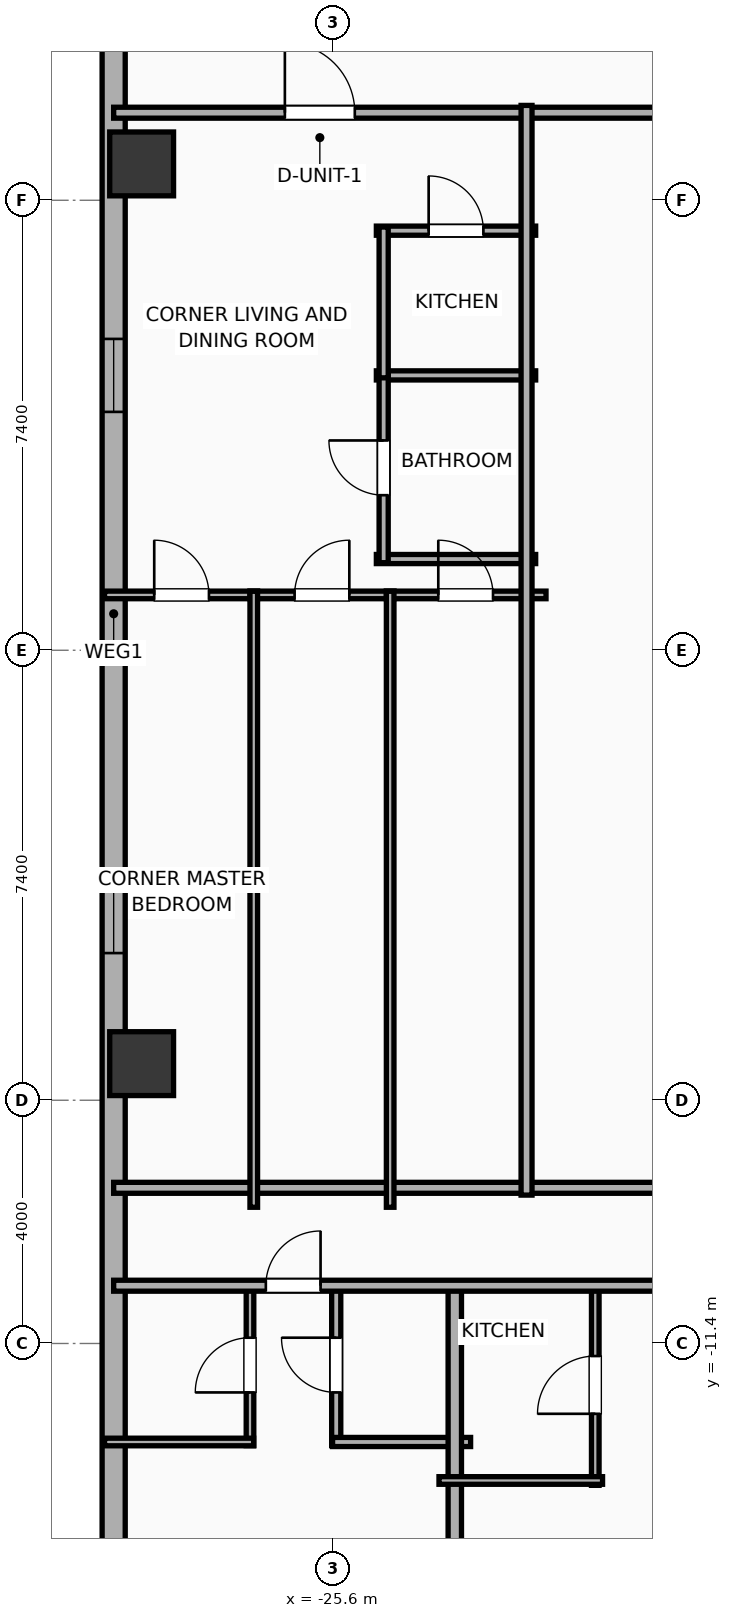
"""IFC4 building model, lengths in metres.
Left out: names, types, materials, properties, quantities, classifications, styles, units other than length and angle.
Written with IfcOpenShell. Run it as: python <this file> out.ifc"""

import sys

from ifc_helpers import new_model, si_unit, direction, frame, frame_2d, origin, origin_2d, place, context, subcontext, project, spatial, rectangle, hollow_rectangle, extrude, element, fill, save


model = new_model("IFC4")
c1 = context("Model", 3, precision=1e-05, world=origin(), true_north=direction((0.0, 1.0)))
c2 = subcontext(c1, "Body", "Model", "MODEL_VIEW")
j1 = project(units=[si_unit("LENGTHUNIT", "METRE"), si_unit("PLANEANGLEUNIT", "RADIAN")], contexts=[c1])
p1 = place(None, origin())
s1 = spatial("IfcSite", under=j1, at=p1, CompositionType="ELEMENT")
p2 = place(p1, origin())
s2 = spatial("IfcBuilding", under=s1, at=p2, CompositionType="ELEMENT")
p3 = place(p2, frame((0.0, 0.0, 93.6)))
s3 = spatial("IfcBuildingStorey", under=s2, at=p3, CompositionType="ELEMENT", Elevation=93.6)
for number, where, z_axis, x_axis in (
    (1, (-28.75, 7.998, 0.0), (0.0, 0.0, 1.0), (1.0, 0.0, 0.0)),
    (2, (-28.75, -6.798, 0.0), (0.0, 0.0, 1.0), (1.0, 0.0, 0.0)),
):
    element("IfcColumn", number, at=place(p3, frame(where, z_axis=z_axis, x_axis=x_axis)), inside=s3, PredefinedType="COLUMN", context=c2, shape_type="SweptSolid", body=[
        extrude(hollow_rectangle(XDim=1.05, YDim=1.05, WallThickness=0.036, at=origin_2d()), origin(), (0.0, 0.0, 1.0), 3.9),
    ])
p4 = place(p3, frame((-29.21, -16.581, 0.0), z_axis=(0.0, 0.0, 1.0), x_axis=(0.0, 1.0, 0.0)))
e3 = element("IfcWall", 3, at=p4, inside=s3, PredefinedType="ELEMENTEDWALL", context=c2, shape_type="SweptSolid", body=[
    extrude(rectangle(XDim=34.363, YDim=0.38, at=frame_2d((17.181, 0.0))), origin(), (0.0, 0.0, 1.0), 3.65),
])
p5 = place(p4, frame((30.932, 0.0, 0.75)))
e4 = element("IfcOpeningElement", 4, at=p5, cuts=e3, PredefinedType="OPENING", context=c2, shape_type="SweptSolid", body=[
    extrude(rectangle(XDim=1.2, YDim=2.05, at=frame_2d((0.6, 1.025))), frame((0.0, 0.2, 0.0), z_axis=(0.0, -1.0, 0.0), x_axis=(1.0, 0.0, 0.0)), (0.0, 0.0, 1.0), 0.4),
])
p6 = place(p4, frame((20.501, 0.0, 0.75)))
e5 = element("IfcOpeningElement", 5, at=p6, cuts=e3, PredefinedType="OPENING", context=c2, shape_type="SweptSolid", body=[
    extrude(rectangle(XDim=1.2, YDim=2.05, at=frame_2d((0.6, 1.025))), frame((0.0, 0.2, 0.0), z_axis=(0.0, -1.0, 0.0), x_axis=(1.0, 0.0, 0.0)), (0.0, 0.0, 1.0), 0.4),
])
p7 = place(p4, frame((11.601, 0.0, 0.75)))
e6 = element("IfcOpeningElement", 6, at=p7, cuts=e3, PredefinedType="OPENING", context=c2, shape_type="SweptSolid", body=[
    extrude(rectangle(XDim=1.2, YDim=2.05, at=frame_2d((0.6, 1.025))), frame((0.0, 0.2, 0.0), z_axis=(0.0, -1.0, 0.0), x_axis=(1.0, 0.0, 0.0)), (0.0, 0.0, 1.0), 0.4),
])
p8 = place(p3, frame((-29.21, 8.84, 0.0), z_axis=(0.0, 0.0, 1.0), x_axis=(1.0, 0.0, 0.0)))
e7 = element("IfcWall", 7, at=p8, inside=s3, PredefinedType="PARTITIONING", context=c2, shape_type="SweptSolid", body=[
    extrude(rectangle(XDim=19.33, YDim=0.18, at=frame_2d((9.665, 0.0))), origin(), (0.0, 0.0, 1.0), 3.65),
])
p9 = place(p8, frame((2.815, 0.0, 0.0)))
e8 = element("IfcOpeningElement", 8, at=p9, cuts=e7, PredefinedType="OPENING", context=c2, shape_type="SweptSolid", body=[
    extrude(rectangle(XDim=1.15, YDim=2.05, at=frame_2d((0.575, 1.025))), frame((0.0, 0.1, 0.0), z_axis=(0.0, -1.0, 0.0), x_axis=(1.0, 0.0, 0.0)), (0.0, 0.0, 1.0), 0.2),
])
p10 = place(p3, frame((-29.21, -8.84, 0.0), z_axis=(0.0, 0.0, 1.0), x_axis=(1.0, 0.0, 0.0)))
e9 = element("IfcWall", 9, at=p10, inside=s3, PredefinedType="PARTITIONING", context=c2, shape_type="SweptSolid", body=[
    extrude(rectangle(XDim=19.33, YDim=0.18, at=frame_2d((9.665, 0.0))), origin(), (0.0, 0.0, 1.0), 3.65),
])
p11 = place(p3, frame((-26.968, -13.08, 0.0), z_axis=(0.0, 0.0, 1.0), x_axis=(0.0, 1.0, 0.0)))
e10 = element("IfcWall", 10, at=p11, inside=s3, PredefinedType="PARTITIONING", context=c2, shape_type="SweptSolid", body=[
    extrude(rectangle(XDim=2.65, YDim=0.125, at=frame_2d((1.325, 0.0))), origin(), (0.0, 0.0, 1.0), 3.65),
])
p12 = place(p11, frame((0.875, 0.0, 0.0)))
e11 = element("IfcOpeningElement", 11, at=p12, cuts=e10, PredefinedType="OPENING", context=c2, shape_type="SweptSolid", body=[
    extrude(rectangle(XDim=0.9, YDim=2.05, at=frame_2d((0.45, 1.025))), frame((0.0, 0.073, 0.0), z_axis=(0.0, -1.0, 0.0), x_axis=(1.0, 0.0, 0.0)), (0.0, 0.0, 1.0), 0.145),
])
p13 = place(p3, frame((-25.55, -13.08, 0.0), z_axis=(0.0, 0.0, 1.0), x_axis=(0.0, 1.0, 0.0)))
e12 = element("IfcWall", 12, at=p13, inside=s3, PredefinedType="PLUMBINGWALL", context=c2, shape_type="SweptSolid", body=[
    extrude(rectangle(XDim=2.65, YDim=0.15, at=frame_2d((1.325, 0.0))), origin(), (0.0, 0.0, 1.0), 3.65),
])
p14 = place(p13, frame((0.875, 0.0, 0.0)))
e13 = element("IfcOpeningElement", 13, at=p14, cuts=e12, PredefinedType="OPENING", context=c2, shape_type="SweptSolid", body=[
    extrude(rectangle(XDim=0.9, YDim=2.05, at=frame_2d((0.45, 1.025))), frame((0.0, 0.085, 0.0), z_axis=(0.0, -1.0, 0.0), x_axis=(1.0, 0.0, 0.0)), (0.0, 0.0, 1.0), 0.17),
])
p15 = place(p3, frame((-29.36, -13.02, 0.0), z_axis=(0.0, 0.0, 1.0), x_axis=(1.0, 0.0, 0.0)))
e14 = element("IfcWall", 14, at=p15, inside=s3, PredefinedType="PARTITIONING", context=c2, shape_type="SweptSolid", body=[
    extrude(rectangle(XDim=2.452, YDim=0.125, at=frame_2d((1.226, 0.0))), origin(), (0.0, 0.0, 1.0), 3.65),
])
p16 = place(p3, frame((-25.61, -13.02, 0.0), z_axis=(0.0, 0.0, 1.0), x_axis=(1.0, 0.0, 0.0)))
e15 = element("IfcWall", 15, at=p16, inside=s3, PredefinedType="PLUMBINGWALL", context=c2, shape_type="SweptSolid", body=[
    extrude(rectangle(XDim=2.27, YDim=0.15, at=frame_2d((1.135, 0.0))), origin(), (0.0, 0.0, 1.0), 3.65),
])
p17 = place(p3, frame((-23.6, -20.41, 0.0), z_axis=(0.0, 0.0, 1.0), x_axis=(0.0, 1.0, 0.0)))
e16 = element("IfcWall", 16, at=p17, inside=s3, PredefinedType="PARTITIONING", context=c2, shape_type="SweptSolid", body=[
    extrude(rectangle(XDim=10.04, YDim=0.22, at=frame_2d((5.02, 0.0))), origin(), (0.0, 0.0, 1.0), 3.65),
])
p18 = place(p3, frame((-21.29, -13.733, 0.0), z_axis=(0.0, 0.0, 1.0), x_axis=(0.0, 1.0, 0.0)))
e17 = element("IfcWall", 17, at=p18, inside=s3, PredefinedType="PARTITIONING", context=c2, shape_type="SweptSolid", body=[
    extrude(rectangle(XDim=3.303, YDim=0.125, at=frame_2d((1.651, 0.0))), origin(), (0.0, 0.0, 1.0), 3.65),
])
p19 = place(p18, frame((1.177, 0.0, 0.0)))
e18 = element("IfcOpeningElement", 18, at=p19, cuts=e17, PredefinedType="OPENING", context=c2, shape_type="SweptSolid", body=[
    extrude(rectangle(XDim=0.95, YDim=2.05, at=frame_2d((0.475, 1.025))), frame((0.0, 0.073, 0.0), z_axis=(0.0, -1.0, 0.0), x_axis=(1.0, 0.0, 0.0)), (0.0, 0.0, 1.0), 0.145),
])
p20 = place(p3, frame((-23.86, -13.653, 0.0), z_axis=(0.0, 0.0, 1.0), x_axis=(1.0, 0.0, 0.0)))
e19 = element("IfcWall", 19, at=p20, inside=s3, PredefinedType="PARTITIONING", context=c2, shape_type="SweptSolid", body=[
    extrude(rectangle(XDim=2.69, YDim=0.125, at=frame_2d((1.345, 0.0))), origin(), (0.0, 0.0, 1.0), 3.65),
])
p21 = place(p3, frame((-29.21, -10.45, 0.0), z_axis=(0.0, 0.0, 1.0), x_axis=(1.0, 0.0, 0.0)))
e20 = element("IfcWall", 20, at=p21, inside=s3, PredefinedType="PARTITIONING", context=c2, shape_type="SweptSolid", body=[
    extrude(rectangle(XDim=62.42, YDim=0.18, at=frame_2d((31.21, 0.0))), origin(), (0.0, 0.0, 1.0), 3.65),
])
p22 = place(p21, frame((2.502, 0.0, 0.0)))
e21 = element("IfcOpeningElement", 21, at=p22, cuts=e20, PredefinedType="OPENING", context=c2, shape_type="SweptSolid", body=[
    extrude(rectangle(XDim=0.9, YDim=2.05, at=frame_2d((0.45, 1.025))), frame((0.0, 0.1, 0.0), z_axis=(0.0, -1.0, 0.0), x_axis=(1.0, 0.0, 0.0)), (0.0, 0.0, 1.0), 0.2),
])
p23 = place(p21, frame((9.0, 0.0, 0.0)))
e22 = element("IfcOpeningElement", 22, at=p23, cuts=e20, PredefinedType="OPENING", context=c2, shape_type="SweptSolid", body=[
    extrude(rectangle(XDim=1.15, YDim=2.05, at=frame_2d((0.575, 1.025))), frame((0.0, 0.1, 0.0), z_axis=(0.0, -1.0, 0.0), x_axis=(1.0, 0.0, 0.0)), (0.0, 0.0, 1.0), 0.2),
])
p24 = place(p21, frame((16.603, 0.0, 0.0)))
e23 = element("IfcOpeningElement", 23, at=p24, cuts=e20, PredefinedType="OPENING", context=c2, shape_type="SweptSolid", body=[
    extrude(rectangle(XDim=1.15, YDim=2.05, at=frame_2d((0.575, 1.025))), frame((0.0, 0.1, 0.0), z_axis=(0.0, -1.0, 0.0), x_axis=(1.0, 0.0, 0.0)), (0.0, 0.0, 1.0), 0.2),
])
p25 = place(p21, frame((24.199, 0.0, 0.0)))
e24 = element("IfcOpeningElement", 24, at=p25, cuts=e20, PredefinedType="OPENING", context=c2, shape_type="SweptSolid", body=[
    extrude(rectangle(XDim=1.15, YDim=2.05, at=frame_2d((0.575, 1.025))), frame((0.0, 0.1, 0.0), z_axis=(0.0, -1.0, 0.0), x_axis=(1.0, 0.0, 0.0)), (0.0, 0.0, 1.0), 0.2),
])
p26 = place(p21, frame((31.802, 0.0, 0.0)))
e25 = element("IfcOpeningElement", 25, at=p26, cuts=e20, PredefinedType="OPENING", context=c2, shape_type="SweptSolid", body=[
    extrude(rectangle(XDim=1.15, YDim=2.05, at=frame_2d((0.575, 1.025))), frame((0.0, 0.1, 0.0), z_axis=(0.0, -1.0, 0.0), x_axis=(1.0, 0.0, 0.0)), (0.0, 0.0, 1.0), 0.2),
])
p27 = place(p21, frame((39.399, 0.0, 0.0)))
e26 = element("IfcOpeningElement", 26, at=p27, cuts=e20, PredefinedType="OPENING", context=c2, shape_type="SweptSolid", body=[
    extrude(rectangle(XDim=1.15, YDim=2.05, at=frame_2d((0.575, 1.025))), frame((0.0, 0.1, 0.0), z_axis=(0.0, -1.0, 0.0), x_axis=(1.0, 0.0, 0.0)), (0.0, 0.0, 1.0), 0.2),
])
p28 = place(p21, frame((47.001, 0.0, 0.0)))
e27 = element("IfcOpeningElement", 27, at=p28, cuts=e20, PredefinedType="OPENING", context=c2, shape_type="SweptSolid", body=[
    extrude(rectangle(XDim=1.15, YDim=2.05, at=frame_2d((0.575, 1.025))), frame((0.0, 0.1, 0.0), z_axis=(0.0, -1.0, 0.0), x_axis=(1.0, 0.0, 0.0)), (0.0, 0.0, 1.0), 0.2),
])
p29 = place(p21, frame((52.363, 0.0, 0.0)))
e28 = element("IfcOpeningElement", 28, at=p29, cuts=e20, PredefinedType="OPENING", context=c2, shape_type="SweptSolid", body=[
    extrude(rectangle(XDim=1.15, YDim=2.05, at=frame_2d((0.575, 1.025))), frame((0.0, 0.1, 0.0), z_axis=(0.0, -1.0, 0.0), x_axis=(1.0, 0.0, 0.0)), (0.0, 0.0, 1.0), 0.2),
])
p30 = place(p21, frame((59.386, 0.0, 0.0)))
e29 = element("IfcOpeningElement", 29, at=p30, cuts=e20, PredefinedType="OPENING", context=c2, shape_type="SweptSolid", body=[
    extrude(rectangle(XDim=0.9, YDim=2.05, at=frame_2d((0.45, 1.025))), frame((0.0, 0.1, 0.0), z_axis=(0.0, -1.0, 0.0), x_axis=(1.0, 0.0, 0.0)), (0.0, 0.0, 1.0), 0.2),
])
p31 = place(p3, frame((-24.89, 6.9, 0.0), z_axis=(0.0, 0.0, 1.0), x_axis=(1.0, 0.0, 0.0)))
e30 = element("IfcWall", 30, at=p31, inside=s3, PredefinedType="PLUMBINGWALL", context=c2, shape_type="SweptSolid", body=[
    extrude(rectangle(XDim=2.62, YDim=0.15, at=frame_2d((1.31, 0.0))), origin(), (0.0, 0.0, 1.0), 3.65),
])
p32 = place(p31, frame((0.86, 0.0, 0.0)))
e31 = element("IfcOpeningElement", 31, at=p32, cuts=e30, PredefinedType="OPENING", context=c2, shape_type="SweptSolid", body=[
    extrude(rectangle(XDim=0.9, YDim=2.05, at=frame_2d((0.45, 1.025))), frame((0.0, 0.085, 0.0), z_axis=(0.0, -1.0, 0.0), x_axis=(1.0, 0.0, 0.0)), (0.0, 0.0, 1.0), 0.17),
])
for number, where, z_axis, x_axis in (
    (32, (-24.89, 4.52, 0.0), (0.0, 0.0, 1.0), (1.0, 0.0, 0.0)),
    (33, (-24.89, 1.5, 0.0), (0.0, 0.0, 1.0), (1.0, 0.0, 0.0)),
):
    element("IfcWall", number, at=place(p3, frame(where, z_axis=z_axis, x_axis=x_axis)), inside=s3, PredefinedType="PLUMBINGWALL", context=c2, shape_type="SweptSolid", body=[
        extrude(rectangle(XDim=2.62, YDim=0.15, at=frame_2d((1.31, 0.0))), origin(), (0.0, 0.0, 1.0), 3.65),
    ])
p33 = place(p3, frame((-24.77, 1.44, 0.0), z_axis=(0.0, 0.0, 1.0), x_axis=(0.0, 1.0, 0.0)))
e34 = element("IfcWall", 34, at=p33, inside=s3, PredefinedType="PLUMBINGWALL", context=c2, shape_type="SweptSolid", body=[
    extrude(rectangle(XDim=3.12, YDim=0.15, at=frame_2d((1.56, 0.0))), origin(), (0.0, 0.0, 1.0), 3.65),
])
p34 = place(p33, frame((1.11, 0.0, 0.0)))
e35 = element("IfcOpeningElement", 35, at=p34, cuts=e34, PredefinedType="OPENING", context=c2, shape_type="SweptSolid", body=[
    extrude(rectangle(XDim=0.9, YDim=2.05, at=frame_2d((0.45, 1.025))), frame((0.0, 0.085, 0.0), z_axis=(0.0, -1.0, 0.0), x_axis=(1.0, 0.0, 0.0)), (0.0, 0.0, 1.0), 0.17),
])
p35 = place(p3, frame((-24.77, 4.48, 0.0), z_axis=(0.0, 0.0, 1.0), x_axis=(0.0, 1.0, 0.0)))
e36 = element("IfcWall", 36, at=p35, inside=s3, PredefinedType="PLUMBINGWALL", context=c2, shape_type="SweptSolid", body=[
    extrude(rectangle(XDim=2.48, YDim=0.15, at=frame_2d((1.24, 0.0))), origin(), (0.0, 0.0, 1.0), 3.65),
])
p36 = place(p3, frame((-29.36, 0.91, 0.0), z_axis=(0.0, 0.0, 1.0), x_axis=(1.0, 0.0, 0.0)))
e37 = element("IfcWall", 37, at=p36, inside=s3, PredefinedType="PARTITIONING", context=c2, shape_type="SweptSolid", body=[
    extrude(rectangle(XDim=2.517, YDim=0.125, at=frame_2d((1.258, 0.0))), origin(), (0.0, 0.0, 1.0), 3.65),
])
p37 = place(p36, frame((0.817, 0.0, 0.0)))
e38 = element("IfcOpeningElement", 38, at=p37, cuts=e37, PredefinedType="OPENING", context=c2, shape_type="SweptSolid", body=[
    extrude(rectangle(XDim=0.9, YDim=2.05, at=frame_2d((0.45, 1.025))), frame((0.0, 0.073, 0.0), z_axis=(0.0, -1.0, 0.0), x_axis=(1.0, 0.0, 0.0)), (0.0, 0.0, 1.0), 0.145),
])
p38 = place(p3, frame((-26.969, 0.91, 0.0), z_axis=(0.0, 0.0, 1.0), x_axis=(1.0, 0.0, 0.0)))
e39 = element("IfcWall", 39, at=p38, inside=s3, PredefinedType="PARTITIONING", context=c2, shape_type="SweptSolid", body=[
    extrude(rectangle(XDim=2.368, YDim=0.125, at=frame_2d((1.184, 0.0))), origin(), (0.0, 0.0, 1.0), 3.65),
])
p39 = place(p38, frame((0.734, 0.0, 0.0)))
e40 = element("IfcOpeningElement", 40, at=p39, cuts=e39, PredefinedType="OPENING", context=c2, shape_type="SweptSolid", body=[
    extrude(rectangle(XDim=0.9, YDim=2.05, at=frame_2d((0.45, 1.025))), frame((0.0, 0.073, 0.0), z_axis=(0.0, -1.0, 0.0), x_axis=(1.0, 0.0, 0.0)), (0.0, 0.0, 1.0), 0.145),
])
p40 = place(p3, frame((-24.726, 0.91, 0.0), z_axis=(0.0, 0.0, 1.0), x_axis=(1.0, 0.0, 0.0)))
e41 = element("IfcWall", 41, at=p40, inside=s3, PredefinedType="PARTITIONING", context=c2, shape_type="SweptSolid", body=[
    extrude(rectangle(XDim=2.625, YDim=0.125, at=frame_2d((1.313, 0.0))), origin(), (0.0, 0.0, 1.0), 3.65),
])
p41 = place(p40, frame((0.854, 0.0, 0.0)))
e42 = element("IfcOpeningElement", 42, at=p41, cuts=e41, PredefinedType="OPENING", context=c2, shape_type="SweptSolid", body=[
    extrude(rectangle(XDim=0.9, YDim=2.05, at=frame_2d((0.45, 1.025))), frame((0.0, 0.073, 0.0), z_axis=(0.0, -1.0, 0.0), x_axis=(1.0, 0.0, 0.0)), (0.0, 0.0, 1.0), 0.145),
])
for number, where, z_axis, x_axis in (
    (43, (-24.663, -9.16, 0.0), (0.0, 0.0, 1.0), (0.0, 1.0, 0.0)),
    (44, (-26.906, -9.16, 0.0), (0.0, 0.0, 1.0), (0.0, 1.0, 0.0)),
):
    element("IfcWall", number, at=place(p3, frame(where, z_axis=z_axis, x_axis=x_axis)), inside=s3, PredefinedType="PARTITIONING", context=c2, shape_type="SweptSolid", body=[
        extrude(rectangle(XDim=10.13, YDim=0.125, at=frame_2d((5.065, 0.0))), origin(), (0.0, 0.0, 1.0), 3.65),
    ])
p42 = place(p3, frame((-22.42, -8.96, 0.0), z_axis=(0.0, 0.0, 1.0), x_axis=(0.0, 1.0, 0.0)))
e45 = element("IfcWall", 45, at=p42, inside=s3, PredefinedType="PARTITIONING", context=c2, shape_type="SweptSolid", body=[
    extrude(rectangle(XDim=17.92, YDim=0.18, at=frame_2d((8.96, 0.0))), origin(), (0.0, 0.0, 1.0), 3.65),
])
p43 = place(p6, origin())
e46 = element("IfcWindow", 46, at=p43, inside=s3, PartitioningType="SINGLE_PANEL", PredefinedType="WINDOW", context=c2, shape_type="SweptSolid", body=[
    extrude(rectangle(XDim=1.2, YDim=2.05, at=frame_2d((0.6, 1.025))), frame((0.0, 0.03, 0.0), z_axis=(0.0, -1.0, 0.0), x_axis=(1.0, 0.0, 0.0)), (0.0, 0.0, 1.0), 0.06),
])
fill(e5, e46)
p44 = place(p7, origin())
e47 = element("IfcWindow", 47, at=p44, inside=s3, PartitioningType="SINGLE_PANEL", PredefinedType="WINDOW", context=c2, shape_type="SweptSolid", body=[
    extrude(rectangle(XDim=1.2, YDim=2.05, at=frame_2d((0.6, 1.025))), frame((0.0, 0.03, 0.0), z_axis=(0.0, -1.0, 0.0), x_axis=(1.0, 0.0, 0.0)), (0.0, 0.0, 1.0), 0.06),
])
fill(e6, e47)
p45 = place(p9, origin())
e48 = element("IfcDoor", 48, at=p45, inside=s3, OperationType="SINGLE_SWING_LEFT", PredefinedType="DOOR", context=c2, shape_type="SweptSolid", body=[
    extrude(rectangle(XDim=1.15, YDim=2.05, at=frame_2d((0.575, 1.025))), frame((0.0, 0.025, 0.0), z_axis=(0.0, -1.0, 0.0), x_axis=(1.0, 0.0, 0.0)), (0.0, 0.0, 1.0), 0.05),
])
fill(e8, e48)
p46 = place(p12, origin())
e49 = element("IfcDoor", 49, at=p46, inside=s3, OperationType="SINGLE_SWING_LEFT", PredefinedType="DOOR", context=c2, shape_type="SweptSolid", body=[
    extrude(rectangle(XDim=0.9, YDim=2.05, at=frame_2d((0.45, 1.025))), frame((0.0, 0.025, 0.0), z_axis=(0.0, -1.0, 0.0), x_axis=(1.0, 0.0, 0.0)), (0.0, 0.0, 1.0), 0.05),
])
fill(e11, e49)
p47 = place(p14, origin())
e50 = element("IfcDoor", 50, at=p47, inside=s3, OperationType="SINGLE_SWING_RIGHT", PredefinedType="DOOR", context=c2, shape_type="SweptSolid", body=[
    extrude(rectangle(XDim=0.9, YDim=2.05, at=frame_2d((0.45, 1.025))), frame((0.0, 0.025, 0.0), z_axis=(0.0, -1.0, 0.0), x_axis=(1.0, 0.0, 0.0)), (0.0, 0.0, 1.0), 0.05),
])
fill(e13, e50)
p48 = place(p19, origin())
e51 = element("IfcDoor", 51, at=p48, inside=s3, OperationType="SINGLE_SWING_LEFT", PredefinedType="DOOR", context=c2, shape_type="SweptSolid", body=[
    extrude(rectangle(XDim=0.95, YDim=2.05, at=frame_2d((0.475, 1.025))), frame((0.0, 0.025, 0.0), z_axis=(0.0, -1.0, 0.0), x_axis=(1.0, 0.0, 0.0)), (0.0, 0.0, 1.0), 0.05),
])
fill(e18, e51)
p49 = place(p22, origin())
e52 = element("IfcDoor", 52, at=p49, inside=s3, OperationType="SINGLE_SWING_RIGHT", PredefinedType="DOOR", context=c2, shape_type="SweptSolid", body=[
    extrude(rectangle(XDim=0.9, YDim=2.05, at=frame_2d((0.45, 1.025))), frame((0.0, 0.025, 0.0), z_axis=(0.0, -1.0, 0.0), x_axis=(1.0, 0.0, 0.0)), (0.0, 0.0, 1.0), 0.05),
])
fill(e21, e52)
p50 = place(p32, origin())
e53 = element("IfcDoor", 53, at=p50, inside=s3, OperationType="SINGLE_SWING_LEFT", PredefinedType="DOOR", context=c2, shape_type="SweptSolid", body=[
    extrude(rectangle(XDim=0.9, YDim=2.05, at=frame_2d((0.45, 1.025))), frame((0.0, 0.025, 0.0), z_axis=(0.0, -1.0, 0.0), x_axis=(1.0, 0.0, 0.0)), (0.0, 0.0, 1.0), 0.05),
])
fill(e31, e53)
p51 = place(p34, origin())
e54 = element("IfcDoor", 54, at=p51, inside=s3, OperationType="SINGLE_SWING_RIGHT", PredefinedType="DOOR", context=c2, shape_type="SweptSolid", body=[
    extrude(rectangle(XDim=0.9, YDim=2.05, at=frame_2d((0.45, 1.025))), frame((0.0, 0.025, 0.0), z_axis=(0.0, -1.0, 0.0), x_axis=(1.0, 0.0, 0.0)), (0.0, 0.0, 1.0), 0.05),
])
fill(e35, e54)
p52 = place(p37, origin())
e55 = element("IfcDoor", 55, at=p52, inside=s3, OperationType="SINGLE_SWING_LEFT", PredefinedType="DOOR", context=c2, shape_type="SweptSolid", body=[
    extrude(rectangle(XDim=0.9, YDim=2.05, at=frame_2d((0.45, 1.025))), frame((0.0, 0.025, 0.0), z_axis=(0.0, -1.0, 0.0), x_axis=(1.0, 0.0, 0.0)), (0.0, 0.0, 1.0), 0.05),
])
fill(e38, e55)
p53 = place(p39, origin())
e56 = element("IfcDoor", 56, at=p53, inside=s3, OperationType="SINGLE_SWING_RIGHT", PredefinedType="DOOR", context=c2, shape_type="SweptSolid", body=[
    extrude(rectangle(XDim=0.9, YDim=2.05, at=frame_2d((0.45, 1.025))), frame((0.0, 0.025, 0.0), z_axis=(0.0, -1.0, 0.0), x_axis=(1.0, 0.0, 0.0)), (0.0, 0.0, 1.0), 0.05),
])
fill(e40, e56)
p54 = place(p41, origin())
e57 = element("IfcDoor", 57, at=p54, inside=s3, OperationType="SINGLE_SWING_LEFT", PredefinedType="DOOR", context=c2, shape_type="SweptSolid", body=[
    extrude(rectangle(XDim=0.9, YDim=2.05, at=frame_2d((0.45, 1.025))), frame((0.0, 0.025, 0.0), z_axis=(0.0, -1.0, 0.0), x_axis=(1.0, 0.0, 0.0)), (0.0, 0.0, 1.0), 0.05),
])
fill(e42, e57)
save(model, sys.argv[1])
